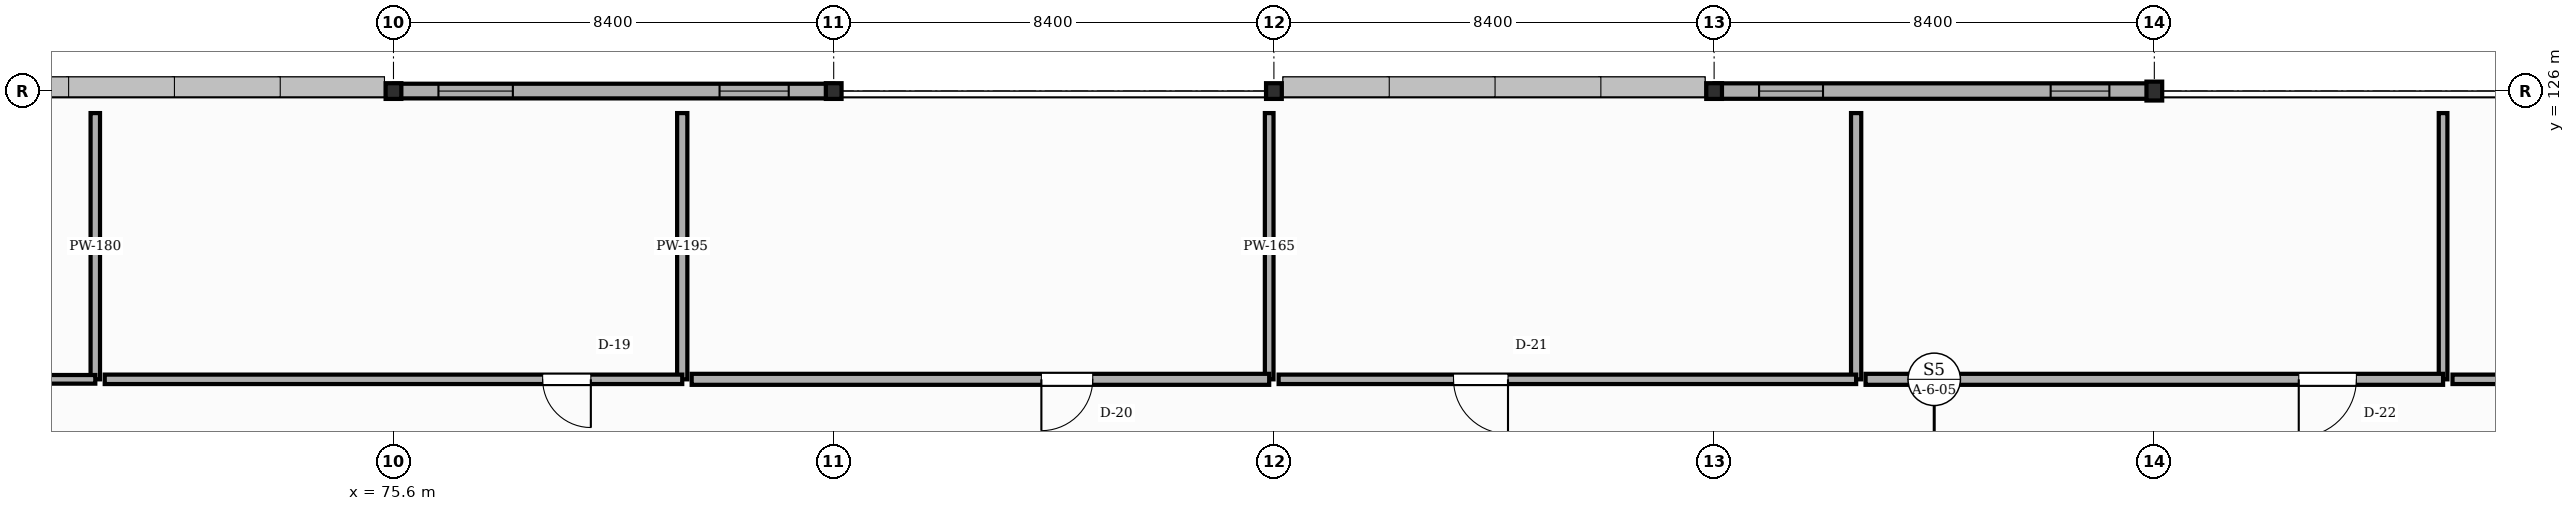
"""IFC4 building model, lengths in metres.
Left out: names, types, materials, properties, quantities, classifications, styles, units other than length and angle.
Written with IfcOpenShell. Run it as: python <this file> out.ifc"""

import sys

from ifc_helpers import new_model, si_unit, direction, frame, frame_2d, origin, origin_2d, place, context, subcontext, project, spatial, rectangle, i_section, extrude, element, fill, save


model = new_model("IFC4")
c1 = context("Model", 3, precision=1e-05, world=origin(), true_north=direction((0.0, 1.0)))
c2 = subcontext(c1, "Body", "Model", "MODEL_VIEW")
j1 = project(units=[si_unit("LENGTHUNIT", "METRE"), si_unit("PLANEANGLEUNIT", "RADIAN")], contexts=[c1])
p1 = place(None, origin())
s1 = spatial("IfcSite", under=j1, at=p1, CompositionType="ELEMENT")
p2 = place(p1, origin())
s2 = spatial("IfcBuilding", under=s1, at=p2, CompositionType="ELEMENT")
p3 = place(p2, frame((0.0, 0.0, 26.1)))
s3 = spatial("IfcBuildingStorey", under=s2, at=p3, CompositionType="ELEMENT", Elevation=26.1)
for number, where, z_axis, x_axis in (
    (1, (75.6, 126.0, 0.0), (0.0, 0.0, 1.0), (1.0, 0.0, 0.0)),
    (2, (84.0, 126.0, 0.0), (0.0, 0.0, 1.0), (1.0, 0.0, 0.0)),
    (3, (92.4, 126.0, 0.0), (0.0, 0.0, 1.0), (1.0, 0.0, 0.0)),
    (4, (100.8, 126.0, 0.0), (0.0, 0.0, 1.0), (1.0, 0.0, 0.0)),
):
    element("IfcColumn", number, at=place(p3, frame(where, z_axis=z_axis, x_axis=x_axis)), inside=s3, PredefinedType="COLUMN", context=c2, shape_type="SweptSolid", body=[
        extrude(i_section(OverallWidth=0.3, OverallDepth=0.3, WebThickness=0.011, FlangeThickness=0.019, FilletRadius=0.027, at=origin_2d()), origin(), (0.0, 0.0, 1.0), 4.05),
    ])
p4 = place(p3, frame((109.2, 126.0, 0.0), z_axis=(0.0, 0.0, 1.0), x_axis=(1.0, 0.0, 0.0)))
e5 = element("IfcColumn", 5, at=p4, inside=s3, PredefinedType="COLUMN", context=c2, shape_type="SweptSolid", body=[
    extrude(i_section(OverallWidth=0.3, OverallDepth=0.36, WebThickness=0.012, FlangeThickness=0.022, FilletRadius=0.027, at=origin_2d()), origin(), (0.0, 0.0, 1.0), 4.05),
])
p5 = place(p3, frame((109.192, 126.0, 0.0), z_axis=(0.0, 0.0, 1.0), x_axis=(-1.0, 0.0, 0.0)))
e6 = element("IfcWall", 6, at=p5, inside=s3, PredefinedType="STANDARD", context=c2, shape_type="SweptSolid", body=[
    extrude(rectangle(XDim=8.384, YDim=0.295, at=frame_2d((4.192, 0.0))), origin(), (0.0, 0.0, 1.0), 3.502),
])
p6 = place(p5, frame((0.85, 0.0, 0.9)))
e7 = element("IfcOpeningElement", 7, at=p6, cuts=e6, PredefinedType="OPENING", context=c2, shape_type="SweptSolid", body=[
    extrude(rectangle(XDim=1.12, YDim=1.65, at=frame_2d((0.56, 0.825))), frame((0.0, 0.157, 0.0), z_axis=(0.0, -1.0, 0.0), x_axis=(1.0, 0.0, 0.0)), (0.0, 0.0, 1.0), 0.315),
])
p7 = place(p5, frame((6.314, 0.0, 0.9)))
e8 = element("IfcOpeningElement", 8, at=p7, cuts=e6, PredefinedType="OPENING", context=c2, shape_type="SweptSolid", body=[
    extrude(rectangle(XDim=1.22, YDim=1.65, at=frame_2d((0.61, 0.825))), frame((0.0, 0.157, 0.0), z_axis=(0.0, -1.0, 0.0), x_axis=(1.0, 0.0, 0.0)), (0.0, 0.0, 1.0), 0.315),
])
p8 = place(p3, frame((83.992, 126.0, 0.0), z_axis=(0.0, 0.0, 1.0), x_axis=(-1.0, 0.0, 0.0)))
e9 = element("IfcWall", 9, at=p8, inside=s3, PredefinedType="STANDARD", context=c2, shape_type="SweptSolid", body=[
    extrude(rectangle(XDim=8.384, YDim=0.28, at=frame_2d((4.192, 0.0))), origin(), (0.0, 0.0, 1.0), 3.472),
])
p9 = place(p8, frame((0.85, 0.0, 0.9)))
e10 = element("IfcOpeningElement", 10, at=p9, cuts=e9, PredefinedType="OPENING", context=c2, shape_type="SweptSolid", body=[
    extrude(rectangle(XDim=1.32, YDim=1.65, at=frame_2d((0.66, 0.825))), frame((0.0, 0.15, 0.0), z_axis=(0.0, -1.0, 0.0), x_axis=(1.0, 0.0, 0.0)), (0.0, 0.0, 1.0), 0.3),
])
p10 = place(p8, frame((6.114, 0.0, 0.9)))
e11 = element("IfcOpeningElement", 11, at=p10, cuts=e9, PredefinedType="OPENING", context=c2, shape_type="SweptSolid", body=[
    extrude(rectangle(XDim=1.42, YDim=1.65, at=frame_2d((0.71, 0.825))), frame((0.0, 0.15, 0.0), z_axis=(0.0, -1.0, 0.0), x_axis=(1.0, 0.0, 0.0)), (0.0, 0.0, 1.0), 0.3),
])
p11 = place(p3, frame((69.91, 125.58, -0.004), z_axis=(0.0, 0.0, 1.0), x_axis=(0.0, -1.0, 0.0)))
e12 = element("IfcWall", 12, at=p11, inside=s3, PredefinedType="STANDARD", context=c2, shape_type="SweptSolid", body=[
    extrude(rectangle(XDim=5.08, YDim=0.18, at=frame_2d((2.54, 0.0))), origin(), (0.0, 0.0, 1.0), 3.566),
])
p12 = place(p3, frame((69.91, 120.5, -0.004), z_axis=(0.0, 0.0, 1.0), x_axis=(-1.0, 0.0, 0.0)))
e13 = element("IfcWall", 13, at=p12, inside=s3, PredefinedType="STANDARD", context=c2, shape_type="SweptSolid", body=[
    extrude(rectangle(XDim=11.02, YDim=0.165, at=frame_2d((5.51, 0.0))), origin(), (0.0, 0.0, 1.0), 3.854),
])
p13 = place(p12, frame((6.303, 0.0, 0.0)))
e14 = element("IfcOpeningElement", 14, at=p13, cuts=e13, PredefinedType="OPENING", context=c2, shape_type="SweptSolid", body=[
    extrude(rectangle(XDim=1.72, YDim=2.14, at=frame_2d((0.86, 1.07))), frame((0.0, 0.093, 0.0), z_axis=(0.0, -1.0, 0.0), x_axis=(1.0, 0.0, 0.0)), (0.0, 0.0, 1.0), 0.185),
])
p14 = place(p3, frame((81.11, 125.58, -0.004), z_axis=(0.0, 0.0, 1.0), x_axis=(0.0, -1.0, 0.0)))
e15 = element("IfcWall", 15, at=p14, inside=s3, PredefinedType="STANDARD", context=c2, shape_type="SweptSolid", body=[
    extrude(rectangle(XDim=5.08, YDim=0.195, at=frame_2d((2.54, 0.0))), origin(), (0.0, 0.0, 1.0), 3.566),
])
p15 = place(p3, frame((81.11, 120.5, -0.004), z_axis=(0.0, 0.0, 1.0), x_axis=(-1.0, 0.0, 0.0)))
e16 = element("IfcWall", 16, at=p15, inside=s3, PredefinedType="STANDARD", context=c2, shape_type="SweptSolid", body=[
    extrude(rectangle(XDim=11.02, YDim=0.18, at=frame_2d((5.51, 0.0))), origin(), (0.0, 0.0, 1.0), 3.854),
])
p16 = place(p15, frame((1.744, 0.0, 0.0)))
e17 = element("IfcOpeningElement", 17, at=p16, cuts=e16, PredefinedType="OPENING", context=c2, shape_type="SweptSolid", body=[
    extrude(rectangle(XDim=0.92, YDim=2.22, at=frame_2d((0.46, 1.11))), frame((0.0, 0.1, 0.0), z_axis=(0.0, -1.0, 0.0), x_axis=(1.0, 0.0, 0.0)), (0.0, 0.0, 1.0), 0.2),
])
p17 = place(p3, frame((92.31, 125.58, -0.004), z_axis=(0.0, 0.0, 1.0), x_axis=(0.0, -1.0, 0.0)))
e18 = element("IfcWall", 18, at=p17, inside=s3, PredefinedType="STANDARD", context=c2, shape_type="SweptSolid", body=[
    extrude(rectangle(XDim=5.08, YDim=0.165, at=frame_2d((2.54, 0.0))), origin(), (0.0, 0.0, 1.0), 3.566),
])
p18 = place(p3, frame((92.31, 120.5, -0.004), z_axis=(0.0, 0.0, 1.0), x_axis=(-1.0, 0.0, 0.0)))
e19 = element("IfcWall", 19, at=p18, inside=s3, PredefinedType="STANDARD", context=c2, shape_type="SweptSolid", body=[
    extrude(rectangle(XDim=11.02, YDim=0.21, at=frame_2d((5.51, 0.0))), origin(), (0.0, 0.0, 1.0), 3.854),
])
p19 = place(p18, frame((3.367, 0.0, 0.0)))
e20 = element("IfcOpeningElement", 20, at=p19, cuts=e19, PredefinedType="OPENING", context=c2, shape_type="SweptSolid", body=[
    extrude(rectangle(XDim=0.98, YDim=2.22, at=frame_2d((0.49, 1.11))), frame((0.0, 0.115, 0.0), z_axis=(0.0, -1.0, 0.0), x_axis=(1.0, 0.0, 0.0)), (0.0, 0.0, 1.0), 0.23),
])
p20 = place(p3, frame((103.51, 125.58, -0.004), z_axis=(0.0, 0.0, 1.0), x_axis=(0.0, -1.0, 0.0)))
e21 = element("IfcWall", 21, at=p20, inside=s3, PredefinedType="STANDARD", context=c2, shape_type="SweptSolid", body=[
    extrude(rectangle(XDim=5.08, YDim=0.195, at=frame_2d((2.54, 0.0))), origin(), (0.0, 0.0, 1.0), 3.566),
])
p21 = place(p3, frame((103.51, 120.5, -0.004), z_axis=(0.0, 0.0, 1.0), x_axis=(-1.0, 0.0, 0.0)))
e22 = element("IfcWall", 22, at=p21, inside=s3, PredefinedType="STANDARD", context=c2, shape_type="SweptSolid", body=[
    extrude(rectangle(XDim=11.02, YDim=0.18, at=frame_2d((5.51, 0.0))), origin(), (0.0, 0.0, 1.0), 3.854),
])
p22 = place(p21, frame((6.643, 0.0, 0.0)))
e23 = element("IfcOpeningElement", 23, at=p22, cuts=e22, PredefinedType="OPENING", context=c2, shape_type="SweptSolid", body=[
    extrude(rectangle(XDim=1.04, YDim=2.22, at=frame_2d((0.52, 1.11))), frame((0.0, 0.1, 0.0), z_axis=(0.0, -1.0, 0.0), x_axis=(1.0, 0.0, 0.0)), (0.0, 0.0, 1.0), 0.2),
])
p23 = place(p3, frame((114.71, 125.58, -0.004), z_axis=(0.0, 0.0, 1.0), x_axis=(0.0, -1.0, 0.0)))
e24 = element("IfcWall", 24, at=p23, inside=s3, PredefinedType="STANDARD", context=c2, shape_type="SweptSolid", body=[
    extrude(rectangle(XDim=5.08, YDim=0.165, at=frame_2d((2.54, 0.0))), origin(), (0.0, 0.0, 1.0), 3.641),
])
p24 = place(p3, frame((114.71, 120.5, -0.004), z_axis=(0.0, 0.0, 1.0), x_axis=(-1.0, 0.0, 0.0)))
e25 = element("IfcWall", 25, at=p24, inside=s3, PredefinedType="STANDARD", context=c2, shape_type="SweptSolid", body=[
    extrude(rectangle(XDim=11.02, YDim=0.21, at=frame_2d((5.51, 0.0))), origin(), (0.0, 0.0, 1.0), 3.854),
])
p25 = place(p24, frame((1.654, 0.0, 0.0)))
e26 = element("IfcOpeningElement", 26, at=p25, cuts=e25, PredefinedType="OPENING", context=c2, shape_type="SweptSolid", body=[
    extrude(rectangle(XDim=1.1, YDim=2.22, at=frame_2d((0.55, 1.11))), frame((0.0, 0.115, 0.0), z_axis=(0.0, -1.0, 0.0), x_axis=(1.0, 0.0, 0.0)), (0.0, 0.0, 1.0), 0.23),
])
p26 = place(p3, frame((124.52, 120.5, -0.004), z_axis=(0.0, 0.0, 1.0), x_axis=(-1.0, 0.0, 0.0)))
e27 = element("IfcWall", 27, at=p26, inside=s3, PredefinedType="STANDARD", context=c2, shape_type="SweptSolid", body=[
    extrude(rectangle(XDim=9.63, YDim=0.18, at=frame_2d((4.815, 0.0))), origin(), (0.0, 0.0, 1.0), 3.854),
])
p27 = place(p26, frame((1.817, 0.0, 0.0)))
e28 = element("IfcOpeningElement", 28, at=p27, cuts=e27, PredefinedType="OPENING", context=c2, shape_type="SweptSolid", body=[
    extrude(rectangle(XDim=1.18, YDim=2.22, at=frame_2d((0.59, 1.11))), frame((0.0, 0.1, 0.0), z_axis=(0.0, -1.0, 0.0), x_axis=(1.0, 0.0, 0.0)), (0.0, 0.0, 1.0), 0.2),
])
p28 = place(p6, origin())
e29 = element("IfcWindow", 29, at=p28, inside=s3, PartitioningType="SINGLE_PANEL", PredefinedType="WINDOW", context=c2, shape_type="SweptSolid", body=[
    extrude(rectangle(XDim=1.12, YDim=1.65, at=frame_2d((0.56, 0.825))), frame((0.0, 0.03, 0.0), z_axis=(0.0, -1.0, 0.0), x_axis=(1.0, 0.0, 0.0)), (0.0, 0.0, 1.0), 0.06),
])
fill(e7, e29)
p29 = place(p7, origin())
e30 = element("IfcWindow", 30, at=p29, inside=s3, PartitioningType="SINGLE_PANEL", PredefinedType="WINDOW", context=c2, shape_type="SweptSolid", body=[
    extrude(rectangle(XDim=1.22, YDim=1.65, at=frame_2d((0.61, 0.825))), frame((0.0, 0.03, 0.0), z_axis=(0.0, -1.0, 0.0), x_axis=(1.0, 0.0, 0.0)), (0.0, 0.0, 1.0), 0.06),
])
fill(e8, e30)
p30 = place(p9, origin())
e31 = element("IfcWindow", 31, at=p30, inside=s3, PartitioningType="SINGLE_PANEL", PredefinedType="WINDOW", context=c2, shape_type="SweptSolid", body=[
    extrude(rectangle(XDim=1.32, YDim=1.65, at=frame_2d((0.66, 0.825))), frame((0.0, 0.03, 0.0), z_axis=(0.0, -1.0, 0.0), x_axis=(1.0, 0.0, 0.0)), (0.0, 0.0, 1.0), 0.06),
])
fill(e10, e31)
p31 = place(p10, origin())
e32 = element("IfcWindow", 32, at=p31, inside=s3, PartitioningType="SINGLE_PANEL", PredefinedType="WINDOW", context=c2, shape_type="SweptSolid", body=[
    extrude(rectangle(XDim=1.42, YDim=1.65, at=frame_2d((0.71, 0.825))), frame((0.0, 0.03, 0.0), z_axis=(0.0, -1.0, 0.0), x_axis=(1.0, 0.0, 0.0)), (0.0, 0.0, 1.0), 0.06),
])
fill(e11, e32)
p32 = place(p16, origin())
e33 = element("IfcDoor", 33, at=p32, inside=s3, OperationType="SINGLE_SWING_LEFT", PredefinedType="DOOR", context=c2, shape_type="SweptSolid", body=[
    extrude(rectangle(XDim=0.92, YDim=2.22, at=frame_2d((0.46, 1.11))), frame((0.0, 0.025, 0.0), z_axis=(0.0, -1.0, 0.0), x_axis=(1.0, 0.0, 0.0)), (0.0, 0.0, 1.0), 0.05),
])
fill(e17, e33)
p33 = place(p19, origin())
e34 = element("IfcDoor", 34, at=p33, inside=s3, OperationType="SINGLE_SWING_RIGHT", PredefinedType="DOOR", context=c2, shape_type="SweptSolid", body=[
    extrude(rectangle(XDim=0.98, YDim=2.22, at=frame_2d((0.49, 1.11))), frame((0.0, 0.025, 0.0), z_axis=(0.0, -1.0, 0.0), x_axis=(1.0, 0.0, 0.0)), (0.0, 0.0, 1.0), 0.05),
])
fill(e20, e34)
p34 = place(p22, origin())
e35 = element("IfcDoor", 35, at=p34, inside=s3, OperationType="SINGLE_SWING_LEFT", PredefinedType="DOOR", context=c2, shape_type="SweptSolid", body=[
    extrude(rectangle(XDim=1.04, YDim=2.22, at=frame_2d((0.52, 1.11))), frame((0.0, 0.025, 0.0), z_axis=(0.0, -1.0, 0.0), x_axis=(1.0, 0.0, 0.0)), (0.0, 0.0, 1.0), 0.05),
])
fill(e23, e35)
p35 = place(p25, origin())
e36 = element("IfcDoor", 36, at=p35, inside=s3, OperationType="SINGLE_SWING_RIGHT", PredefinedType="DOOR", context=c2, shape_type="SweptSolid", body=[
    extrude(rectangle(XDim=1.1, YDim=2.22, at=frame_2d((0.55, 1.11))), frame((0.0, 0.025, 0.0), z_axis=(0.0, -1.0, 0.0), x_axis=(1.0, 0.0, 0.0)), (0.0, 0.0, 1.0), 0.05),
])
fill(e26, e36)
save(model, sys.argv[1])
